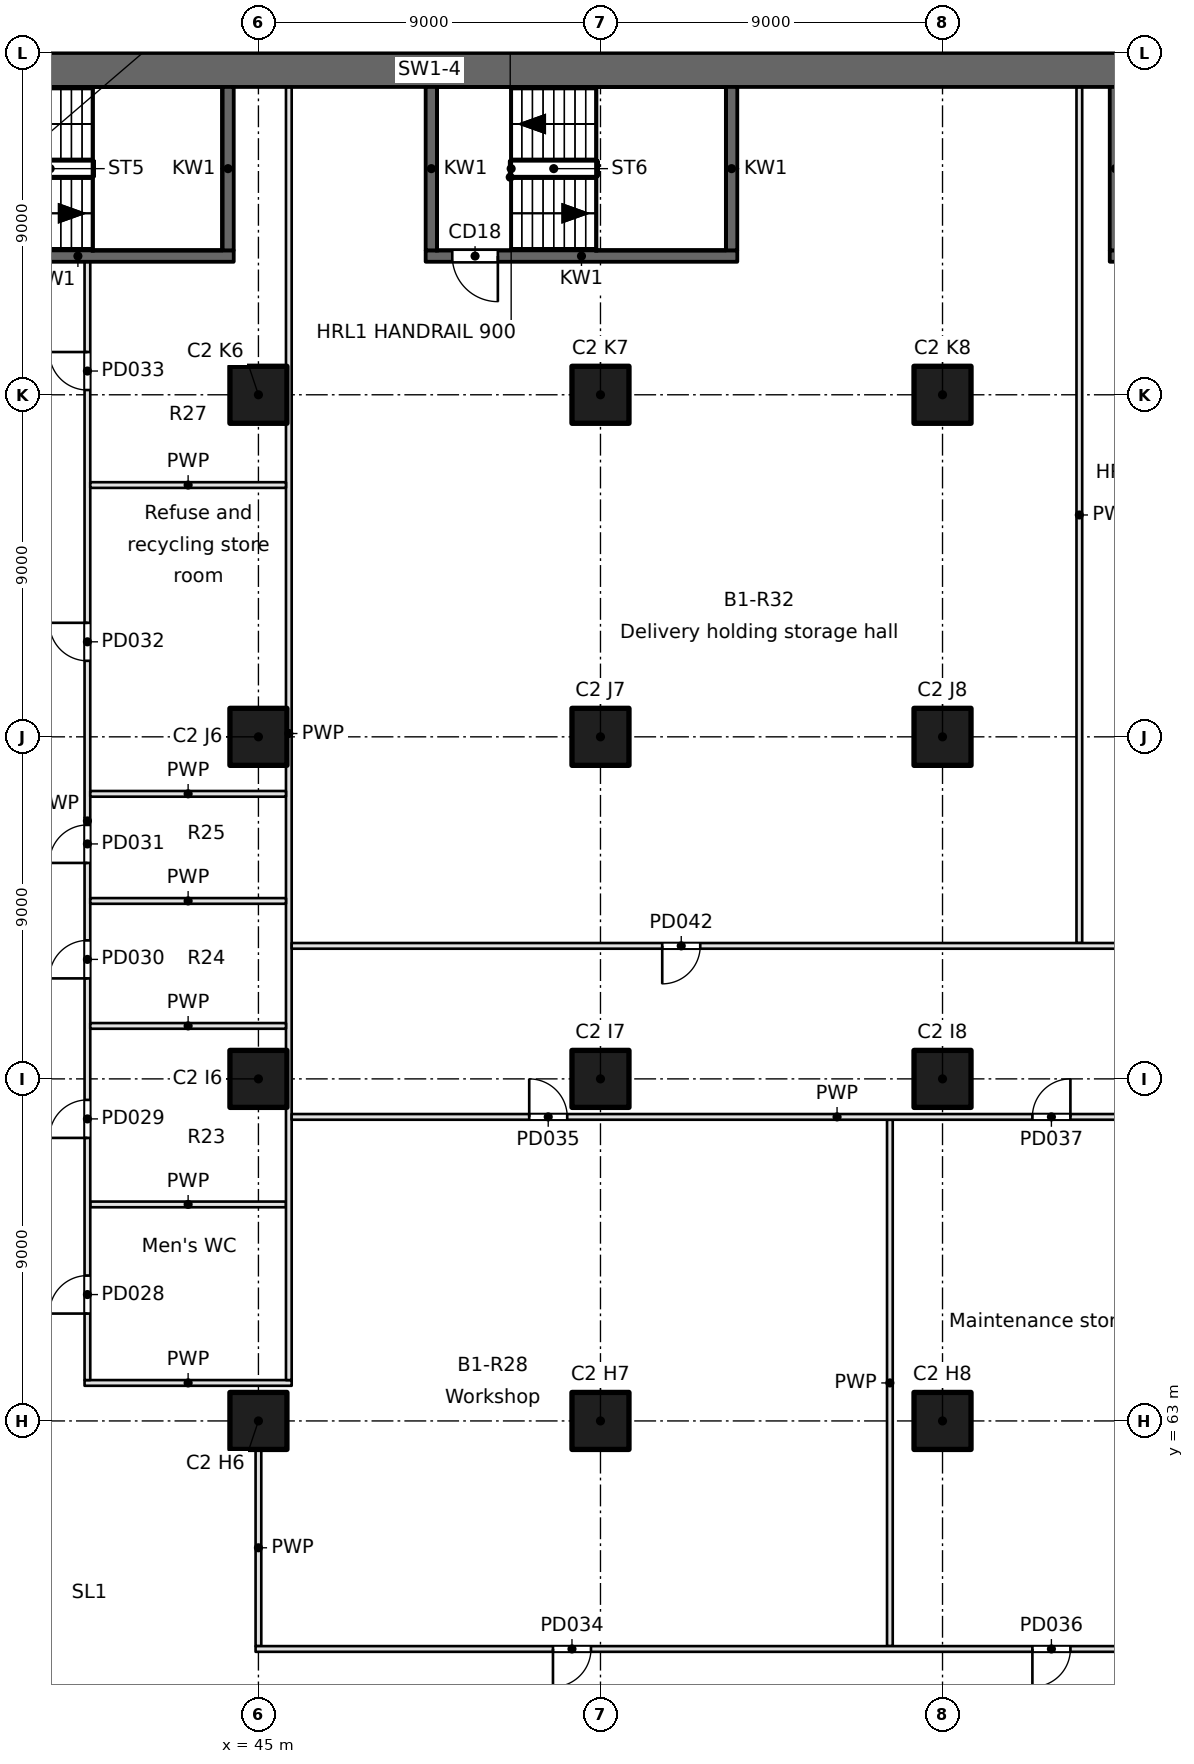
"""IFC4 building model, lengths in metres.
Left out: names, types, materials, properties, quantities, classifications, styles, units other than length and angle.
Written with IfcOpenShell. Run it as: python <this file> out.ifc"""

import sys

from ifc_helpers import new_model, si_unit, direction, frame, frame_2d, origin, origin_2d, place, context, subcontext, project, spatial, rectangle, extrude, element, fill, save


model = new_model("IFC4")
c1 = context("Model", 3, precision=1e-05, world=origin(), true_north=direction((0.0, 1.0)))
c2 = subcontext(c1, "Body", "Model", "MODEL_VIEW")
j1 = project(units=[si_unit("LENGTHUNIT", "METRE"), si_unit("PLANEANGLEUNIT", "RADIAN")], contexts=[c1])
p1 = place(None, origin())
s1 = spatial("IfcSite", under=j1, at=p1, CompositionType="ELEMENT")
p2 = place(p1, origin())
s2 = spatial("IfcBuilding", under=s1, at=p2, CompositionType="ELEMENT")
p3 = place(p2, frame((0.0, 0.0, -6.0)))
s3 = spatial("IfcBuildingStorey", under=s2, at=p3, CompositionType="ELEMENT", Elevation=-6.0)
for number, where, z_axis, x_axis in (
    (1, (45.0, 63.0, -0.6), (0.0, 0.0, 1.0), (1.0, 0.0, 0.0)),
    (2, (45.0, 72.0, -0.6), (0.0, 0.0, 1.0), (1.0, 0.0, 0.0)),
    (3, (45.0, 81.0, -0.6), (0.0, 0.0, 1.0), (1.0, 0.0, 0.0)),
    (4, (45.0, 90.0, -0.6), (0.0, 0.0, 1.0), (1.0, 0.0, 0.0)),
    (5, (54.0, 63.0, -0.6), (0.0, 0.0, 1.0), (1.0, 0.0, 0.0)),
    (6, (54.0, 72.0, -0.6), (0.0, 0.0, 1.0), (1.0, 0.0, 0.0)),
    (7, (54.0, 81.0, -0.6), (0.0, 0.0, 1.0), (1.0, 0.0, 0.0)),
    (8, (54.0, 90.0, -0.6), (0.0, 0.0, 1.0), (1.0, 0.0, 0.0)),
    (9, (63.0, 63.0, -0.6), (0.0, 0.0, 1.0), (1.0, 0.0, 0.0)),
    (10, (63.0, 72.0, -0.6), (0.0, 0.0, 1.0), (1.0, 0.0, 0.0)),
    (11, (63.0, 81.0, -0.6), (0.0, 0.0, 1.0), (1.0, 0.0, 0.0)),
    (12, (63.0, 90.0, -0.6), (0.0, 0.0, 1.0), (1.0, 0.0, 0.0)),
):
    element("IfcColumn", number, at=place(p3, frame(where, z_axis=z_axis, x_axis=x_axis)), inside=s3, PredefinedType="COLUMN", context=c2, shape_type="SweptSolid", body=[
        extrude(rectangle(XDim=1.5, YDim=1.5, at=origin_2d()), origin(), (0.0, 0.0, 1.0), 6.6),
    ])
p4 = place(p3, frame((94.5, 98.55, 0.0), z_axis=(0.0, 0.0, 1.0), x_axis=(-1.0, 0.0, 0.0)))
e13 = element("IfcWall", 13, at=p4, inside=s3, PredefinedType="SHEAR", context=c2, shape_type="SweptSolid", body=[
    extrude(rectangle(XDim=90.0, YDim=0.9, at=frame_2d((45.0, 0.0))), origin(), (0.0, 0.0, 1.0), 6.0),
])
p5 = place(p3, frame((36.15, 93.65, 0.0), z_axis=(0.0, 0.0, 1.0), x_axis=(1.0, 0.0, 0.0)))
e14 = element("IfcWall", 14, at=p5, inside=s3, PredefinedType="SOLIDWALL", context=c2, shape_type="SweptSolid", body=[
    extrude(rectangle(XDim=8.2, YDim=0.3, at=frame_2d((4.1, 0.0))), origin(), (0.0, 0.0, 1.0), 5.6),
])
p6 = place(p5, frame((0.7, 0.0, 0.0)))
e15 = element("IfcOpeningElement", 15, at=p6, cuts=e14, PredefinedType="OPENING", context=c2, shape_type="SweptSolid", body=[
    extrude(rectangle(XDim=1.2, YDim=2.1, at=frame_2d((0.6, 1.05))), frame((0.0, 0.15, 0.0), z_axis=(0.0, -1.0, 0.0), x_axis=(1.0, 0.0, 0.0)), (0.0, 0.0, 1.0), 0.3),
])
p7 = place(p3, frame((49.4, 93.65, 0.0), z_axis=(0.0, 0.0, 1.0), x_axis=(1.0, 0.0, 0.0)))
e16 = element("IfcWall", 16, at=p7, inside=s3, PredefinedType="SOLIDWALL", context=c2, shape_type="SweptSolid", body=[
    extrude(rectangle(XDim=8.2, YDim=0.3, at=frame_2d((4.1, 0.0))), origin(), (0.0, 0.0, 1.0), 5.6),
])
p8 = place(p7, frame((0.7, 0.0, 0.0)))
e17 = element("IfcOpeningElement", 17, at=p8, cuts=e16, PredefinedType="OPENING", context=c2, shape_type="SweptSolid", body=[
    extrude(rectangle(XDim=1.2, YDim=2.1, at=frame_2d((0.6, 1.05))), frame((0.0, 0.15, 0.0), z_axis=(0.0, -1.0, 0.0), x_axis=(1.0, 0.0, 0.0)), (0.0, 0.0, 1.0), 0.3),
])
p9 = place(p3, frame((67.4, 93.65, 0.0), z_axis=(0.0, 0.0, 1.0), x_axis=(1.0, 0.0, 0.0)))
e18 = element("IfcWall", 18, at=p9, inside=s3, PredefinedType="SOLIDWALL", context=c2, shape_type="SweptSolid", body=[
    extrude(rectangle(XDim=8.2, YDim=0.3, at=frame_2d((4.1, 0.0))), origin(), (0.0, 0.0, 1.0), 5.6),
])
p10 = place(p9, frame((0.7, 0.0, 0.0)))
e19 = element("IfcOpeningElement", 19, at=p10, cuts=e18, PredefinedType="OPENING", context=c2, shape_type="SweptSolid", body=[
    extrude(rectangle(XDim=1.2, YDim=2.1, at=frame_2d((0.6, 1.05))), frame((0.0, 0.15, 0.0), z_axis=(0.0, -1.0, 0.0), x_axis=(1.0, 0.0, 0.0)), (0.0, 0.0, 1.0), 0.3),
])
for number, where, z_axis, x_axis in (
    (20, (44.2, 93.8, 0.0), (0.0, 0.0, 1.0), (0.0, 1.0, 0.0)),
    (21, (49.55, 93.8, 0.0), (0.0, 0.0, 1.0), (0.0, 1.0, 0.0)),
    (22, (57.45, 93.8, 0.0), (0.0, 0.0, 1.0), (0.0, 1.0, 0.0)),
    (23, (67.55, 93.8, 0.0), (0.0, 0.0, 1.0), (0.0, 1.0, 0.0)),
):
    element("IfcWall", number, at=place(p3, frame(where, z_axis=z_axis, x_axis=x_axis)), inside=s3, PredefinedType="SOLIDWALL", context=c2, shape_type="SweptSolid", body=[
        extrude(rectangle(XDim=4.3, YDim=0.3, at=frame_2d((2.15, 0.0))), origin(), (0.0, 0.0, 1.0), 5.6),
    ])
p11 = place(p3, frame((45.0, 57.075, 0.0), z_axis=(0.0, 0.0, 1.0), x_axis=(0.0, 1.0, 0.0)))
e24 = element("IfcWall", 24, at=p11, inside=s3, PredefinedType="PARTITIONING", context=c2, shape_type="SweptSolid", body=[
    extrude(rectangle(XDim=5.175, YDim=0.15, at=frame_2d((2.587, 0.0))), origin(), (0.0, 0.0, 1.0), 5.6),
])
p12 = place(p3, frame((40.575, 68.697, 0.0), z_axis=(0.0, 0.0, 1.0), x_axis=(1.0, 0.0, 0.0)))
e25 = element("IfcWall", 25, at=p12, inside=s3, PredefinedType="PARTITIONING", context=c2, shape_type="SweptSolid", body=[
    extrude(rectangle(XDim=5.15, YDim=0.15, at=frame_2d((2.575, 0.0))), origin(), (0.0, 0.0, 1.0), 5.6),
])
p13 = place(p3, frame((45.875, 64.0, 0.0), z_axis=(0.0, 0.0, 1.0), x_axis=(-1.0, 0.0, 0.0)))
e26 = element("IfcWall", 26, at=p13, inside=s3, PredefinedType="PARTITIONING", context=c2, shape_type="SweptSolid", body=[
    extrude(rectangle(XDim=5.45, YDim=0.15, at=frame_2d((2.725, 0.0))), origin(), (0.0, 0.0, 1.0), 5.6),
])
p14 = place(p3, frame((45.8, 64.075, 0.0), z_axis=(0.0, 0.0, 1.0), x_axis=(0.0, 1.0, 0.0)))
e27 = element("IfcWall", 27, at=p14, inside=s3, PredefinedType="PARTITIONING", context=c2, shape_type="SweptSolid", body=[
    extrude(rectangle(XDim=34.025, YDim=0.15, at=frame_2d((17.013, 0.0))), origin(), (0.0, 0.0, 1.0), 5.6),
])
p15 = place(p3, frame((40.5, 64.075, 0.0), z_axis=(0.0, 0.0, 1.0), x_axis=(0.0, 1.0, 0.0)))
e28 = element("IfcWall", 28, at=p15, inside=s3, PredefinedType="PARTITIONING", context=c2, shape_type="SweptSolid", body=[
    extrude(rectangle(XDim=29.425, YDim=0.15, at=frame_2d((14.712, 0.0))), origin(), (0.0, 0.0, 1.0), 5.6),
])
p16 = place(p15, frame((1.75, 0.0, 0.0)))
e29 = element("IfcOpeningElement", 29, at=p16, cuts=e28, PredefinedType="OPENING", context=c2, shape_type="SweptSolid", body=[
    extrude(rectangle(XDim=1.0, YDim=2.1, at=frame_2d((0.5, 1.05))), frame((0.0, 0.075, 0.0), z_axis=(0.0, -1.0, 0.0), x_axis=(1.0, 0.0, 0.0)), (0.0, 0.0, 1.0), 0.15),
])
p17 = place(p15, frame((6.372, 0.0, 0.0)))
e30 = element("IfcOpeningElement", 30, at=p17, cuts=e28, PredefinedType="OPENING", context=c2, shape_type="SweptSolid", body=[
    extrude(rectangle(XDim=1.0, YDim=2.1, at=frame_2d((0.5, 1.05))), frame((0.0, 0.075, 0.0), z_axis=(0.0, -1.0, 0.0), x_axis=(1.0, 0.0, 0.0)), (0.0, 0.0, 1.0), 0.15),
])
p18 = place(p15, frame((10.569, 0.0, 0.0)))
e31 = element("IfcOpeningElement", 31, at=p18, cuts=e28, PredefinedType="OPENING", context=c2, shape_type="SweptSolid", body=[
    extrude(rectangle(XDim=1.0, YDim=2.1, at=frame_2d((0.5, 1.05))), frame((0.0, 0.075, 0.0), z_axis=(0.0, -1.0, 0.0), x_axis=(1.0, 0.0, 0.0)), (0.0, 0.0, 1.0), 0.15),
])
p19 = place(p15, frame((13.607, 0.0, 0.0)))
e32 = element("IfcOpeningElement", 32, at=p19, cuts=e28, PredefinedType="OPENING", context=c2, shape_type="SweptSolid", body=[
    extrude(rectangle(XDim=1.0, YDim=2.1, at=frame_2d((0.5, 1.05))), frame((0.0, 0.075, 0.0), z_axis=(0.0, -1.0, 0.0), x_axis=(1.0, 0.0, 0.0)), (0.0, 0.0, 1.0), 0.15),
])
p20 = place(p15, frame((18.925, 0.0, 0.0)))
e33 = element("IfcOpeningElement", 33, at=p20, cuts=e28, PredefinedType="OPENING", context=c2, shape_type="SweptSolid", body=[
    extrude(rectangle(XDim=1.0, YDim=2.1, at=frame_2d((0.5, 1.05))), frame((0.0, 0.075, 0.0), z_axis=(0.0, -1.0, 0.0), x_axis=(1.0, 0.0, 0.0)), (0.0, 0.0, 1.0), 0.15),
])
p21 = place(p15, frame((26.05, 0.0, 0.0)))
e34 = element("IfcOpeningElement", 34, at=p21, cuts=e28, PredefinedType="OPENING", context=c2, shape_type="SweptSolid", body=[
    extrude(rectangle(XDim=1.0, YDim=2.1, at=frame_2d((0.5, 1.05))), frame((0.0, 0.075, 0.0), z_axis=(0.0, -1.0, 0.0), x_axis=(1.0, 0.0, 0.0)), (0.0, 0.0, 1.0), 0.15),
])
for number, where, z_axis, x_axis in (
    (35, (40.575, 73.394, 0.0), (0.0, 0.0, 1.0), (1.0, 0.0, 0.0)),
    (36, (40.575, 76.682, 0.0), (0.0, 0.0, 1.0), (1.0, 0.0, 0.0)),
    (37, (40.575, 79.5, 0.0), (0.0, 0.0, 1.0), (1.0, 0.0, 0.0)),
    (38, (40.575, 87.625, 0.0), (0.0, 0.0, 1.0), (1.0, 0.0, 0.0)),
):
    element("IfcWall", number, at=place(p3, frame(where, z_axis=z_axis, x_axis=x_axis)), inside=s3, PredefinedType="PARTITIONING", context=c2, shape_type="SweptSolid", body=[
        extrude(rectangle(XDim=5.15, YDim=0.15, at=frame_2d((2.575, 0.0))), origin(), (0.0, 0.0, 1.0), 5.6),
    ])
p22 = place(p3, frame((61.615, 57.075, 0.0), z_axis=(0.0, 0.0, 1.0), x_axis=(0.0, 1.0, 0.0)))
e39 = element("IfcWall", 39, at=p22, inside=s3, PredefinedType="PARTITIONING", context=c2, shape_type="SweptSolid", body=[
    extrude(rectangle(XDim=13.85, YDim=0.15, at=frame_2d((6.925, 0.0))), origin(), (0.0, 0.0, 1.0), 5.6),
])
p23 = place(p3, frame((94.2, 57.0, 0.0), z_axis=(0.0, 0.0, 1.0), x_axis=(-1.0, 0.0, 0.0)))
e40 = element("IfcWall", 40, at=p23, inside=s3, PredefinedType="PARTITIONING", context=c2, shape_type="SweptSolid", body=[
    extrude(rectangle(XDim=49.275, YDim=0.15, at=frame_2d((24.637, 0.0))), origin(), (0.0, 0.0, 1.0), 5.6),
])
p24 = place(p23, frame((40.45, 0.0, 0.0)))
e41 = element("IfcOpeningElement", 41, at=p24, cuts=e40, PredefinedType="OPENING", context=c2, shape_type="SweptSolid", body=[
    extrude(rectangle(XDim=1.0, YDim=2.1, at=frame_2d((0.5, 1.05))), frame((0.0, 0.075, 0.0), z_axis=(0.0, -1.0, 0.0), x_axis=(1.0, 0.0, 0.0)), (0.0, 0.0, 1.0), 0.15),
])
p25 = place(p23, frame((27.835, 0.0, 0.0)))
e42 = element("IfcOpeningElement", 42, at=p25, cuts=e40, PredefinedType="OPENING", context=c2, shape_type="SweptSolid", body=[
    extrude(rectangle(XDim=1.0, YDim=2.1, at=frame_2d((0.5, 1.05))), frame((0.0, 0.075, 0.0), z_axis=(0.0, -1.0, 0.0), x_axis=(1.0, 0.0, 0.0)), (0.0, 0.0, 1.0), 0.15),
])
p26 = place(p23, frame((15.327, 0.0, 0.0)))
e43 = element("IfcOpeningElement", 43, at=p26, cuts=e40, PredefinedType="OPENING", context=c2, shape_type="SweptSolid", body=[
    extrude(rectangle(XDim=1.2, YDim=2.1, at=frame_2d((0.6, 1.05))), frame((0.0, 0.075, 0.0), z_axis=(0.0, -1.0, 0.0), x_axis=(1.0, 0.0, 0.0)), (0.0, 0.0, 1.0), 0.15),
])
p27 = place(p23, frame((3.212, 0.0, 0.0)))
e44 = element("IfcOpeningElement", 44, at=p27, cuts=e40, PredefinedType="OPENING", context=c2, shape_type="SweptSolid", body=[
    extrude(rectangle(XDim=1.2, YDim=2.1, at=frame_2d((0.6, 1.05))), frame((0.0, 0.075, 0.0), z_axis=(0.0, -1.0, 0.0), x_axis=(1.0, 0.0, 0.0)), (0.0, 0.0, 1.0), 0.15),
])
p28 = place(p3, frame((45.875, 71.0, 0.0), z_axis=(0.0, 0.0, 1.0), x_axis=(1.0, 0.0, 0.0)))
e45 = element("IfcWall", 45, at=p28, inside=s3, PredefinedType="PARTITIONING", context=c2, shape_type="SweptSolid", body=[
    extrude(rectangle(XDim=28.7, YDim=0.15, at=frame_2d((14.35, 0.0))), origin(), (0.0, 0.0, 1.0), 5.6),
])
p29 = place(p28, frame((6.25, 0.0, 0.0)))
e46 = element("IfcOpeningElement", 46, at=p29, cuts=e45, PredefinedType="OPENING", context=c2, shape_type="SweptSolid", body=[
    extrude(rectangle(XDim=1.0, YDim=2.1, at=frame_2d((0.5, 1.05))), frame((0.0, 0.075, 0.0), z_axis=(0.0, -1.0, 0.0), x_axis=(1.0, 0.0, 0.0)), (0.0, 0.0, 1.0), 0.15),
])
p30 = place(p28, frame((19.49, 0.0, 0.0)))
e47 = element("IfcOpeningElement", 47, at=p30, cuts=e45, PredefinedType="OPENING", context=c2, shape_type="SweptSolid", body=[
    extrude(rectangle(XDim=1.0, YDim=2.1, at=frame_2d((0.5, 1.05))), frame((0.0, 0.075, 0.0), z_axis=(0.0, -1.0, 0.0), x_axis=(1.0, 0.0, 0.0)), (0.0, 0.0, 1.0), 0.15),
])
p31 = place(p28, frame((27.048, 0.0, 0.0)))
e48 = element("IfcOpeningElement", 48, at=p31, cuts=e45, PredefinedType="OPENING", context=c2, shape_type="SweptSolid", body=[
    extrude(rectangle(XDim=1.2, YDim=2.1, at=frame_2d((0.6, 1.05))), frame((0.0, 0.075, 0.0), z_axis=(0.0, -1.0, 0.0), x_axis=(1.0, 0.0, 0.0)), (0.0, 0.0, 1.0), 0.15),
])
p32 = place(p3, frame((66.6, 75.575, 0.0), z_axis=(0.0, 0.0, 1.0), x_axis=(0.0, 1.0, 0.0)))
e49 = element("IfcWall", 49, at=p32, inside=s3, PredefinedType="PARTITIONING", context=c2, shape_type="SweptSolid", body=[
    extrude(rectangle(XDim=22.525, YDim=0.15, at=frame_2d((11.263, 0.0))), origin(), (0.0, 0.0, 1.0), 5.6),
])
p33 = place(p3, frame((98.7, 75.5, 0.0), z_axis=(0.0, 0.0, 1.0), x_axis=(-1.0, 0.0, 0.0)))
e50 = element("IfcWall", 50, at=p33, inside=s3, PredefinedType="PARTITIONING", context=c2, shape_type="SweptSolid", body=[
    extrude(rectangle(XDim=52.825, YDim=0.15, at=frame_2d((26.413, 0.0))), origin(), (0.0, 0.0, 1.0), 5.6),
])
p34 = place(p33, frame((42.075, 0.0, 0.0)))
e51 = element("IfcOpeningElement", 51, at=p34, cuts=e50, PredefinedType="OPENING", context=c2, shape_type="SweptSolid", body=[
    extrude(rectangle(XDim=1.0, YDim=2.1, at=frame_2d((0.5, 1.05))), frame((0.0, 0.075, 0.0), z_axis=(0.0, -1.0, 0.0), x_axis=(1.0, 0.0, 0.0)), (0.0, 0.0, 1.0), 0.15),
])
p35 = place(p33, frame((26.1, 0.0, 0.0)))
e52 = element("IfcOpeningElement", 52, at=p35, cuts=e50, PredefinedType="OPENING", context=c2, shape_type="SweptSolid", body=[
    extrude(rectangle(XDim=1.0, YDim=2.1, at=frame_2d((0.5, 1.05))), frame((0.0, 0.075, 0.0), z_axis=(0.0, -1.0, 0.0), x_axis=(1.0, 0.0, 0.0)), (0.0, 0.0, 1.0), 0.15),
])
p36 = place(p33, frame((15.35, 0.0, 0.0)))
e53 = element("IfcOpeningElement", 53, at=p36, cuts=e50, PredefinedType="OPENING", context=c2, shape_type="SweptSolid", body=[
    extrude(rectangle(XDim=1.2, YDim=2.1, at=frame_2d((0.6, 1.05))), frame((0.0, 0.075, 0.0), z_axis=(0.0, -1.0, 0.0), x_axis=(1.0, 0.0, 0.0)), (0.0, 0.0, 1.0), 0.15),
])
p37 = place(p33, frame((4.75, 0.0, 0.0)))
e54 = element("IfcOpeningElement", 54, at=p37, cuts=e50, PredefinedType="OPENING", context=c2, shape_type="SweptSolid", body=[
    extrude(rectangle(XDim=1.0, YDim=2.1, at=frame_2d((0.5, 1.05))), frame((0.0, 0.075, 0.0), z_axis=(0.0, -1.0, 0.0), x_axis=(1.0, 0.0, 0.0)), (0.0, 0.0, 1.0), 0.15),
])
p38 = place(p8, frame((1.2, 0.0, 0.0), z_axis=(0.0, 0.0, 1.0), x_axis=(-1.0, 0.0, 0.0)))
e55 = element("IfcDoor", 55, at=p38, inside=s3, OperationType="SINGLE_SWING_LEFT", PredefinedType="DOOR", context=c2, shape_type="SweptSolid", body=[
    extrude(rectangle(XDim=1.2, YDim=2.1, at=frame_2d((0.6, 1.05))), frame((0.0, 0.025, 0.0), z_axis=(0.0, -1.0, 0.0), x_axis=(1.0, 0.0, 0.0)), (0.0, 0.0, 1.0), 0.05),
])
fill(e17, e55)
p39 = place(p16, origin())
e56 = element("IfcDoor", 56, at=p39, inside=s3, OperationType="SINGLE_SWING_LEFT", PredefinedType="DOOR", context=c2, shape_type="SweptSolid", body=[
    extrude(rectangle(XDim=1.0, YDim=2.1, at=frame_2d((0.5, 1.05))), frame((0.0, 0.025, 0.0), z_axis=(0.0, -1.0, 0.0), x_axis=(1.0, 0.0, 0.0)), (0.0, 0.0, 1.0), 0.05),
])
fill(e29, e56)
p40 = place(p17, origin())
e57 = element("IfcDoor", 57, at=p40, inside=s3, OperationType="SINGLE_SWING_LEFT", PredefinedType="DOOR", context=c2, shape_type="SweptSolid", body=[
    extrude(rectangle(XDim=1.0, YDim=2.1, at=frame_2d((0.5, 1.05))), frame((0.0, 0.025, 0.0), z_axis=(0.0, -1.0, 0.0), x_axis=(1.0, 0.0, 0.0)), (0.0, 0.0, 1.0), 0.05),
])
fill(e30, e57)
p41 = place(p18, origin())
e58 = element("IfcDoor", 58, at=p41, inside=s3, OperationType="SINGLE_SWING_LEFT", PredefinedType="DOOR", context=c2, shape_type="SweptSolid", body=[
    extrude(rectangle(XDim=1.0, YDim=2.1, at=frame_2d((0.5, 1.05))), frame((0.0, 0.025, 0.0), z_axis=(0.0, -1.0, 0.0), x_axis=(1.0, 0.0, 0.0)), (0.0, 0.0, 1.0), 0.05),
])
fill(e31, e58)
p42 = place(p19, origin())
e59 = element("IfcDoor", 59, at=p42, inside=s3, OperationType="SINGLE_SWING_LEFT", PredefinedType="DOOR", context=c2, shape_type="SweptSolid", body=[
    extrude(rectangle(XDim=1.0, YDim=2.1, at=frame_2d((0.5, 1.05))), frame((0.0, 0.025, 0.0), z_axis=(0.0, -1.0, 0.0), x_axis=(1.0, 0.0, 0.0)), (0.0, 0.0, 1.0), 0.05),
])
fill(e32, e59)
p43 = place(p20, origin())
e60 = element("IfcDoor", 60, at=p43, inside=s3, OperationType="SINGLE_SWING_RIGHT", PredefinedType="DOOR", context=c2, shape_type="SweptSolid", body=[
    extrude(rectangle(XDim=1.0, YDim=2.1, at=frame_2d((0.5, 1.05))), frame((0.0, 0.025, 0.0), z_axis=(0.0, -1.0, 0.0), x_axis=(1.0, 0.0, 0.0)), (0.0, 0.0, 1.0), 0.05),
])
fill(e33, e60)
p44 = place(p21, origin())
e61 = element("IfcDoor", 61, at=p44, inside=s3, OperationType="SINGLE_SWING_RIGHT", PredefinedType="DOOR", context=c2, shape_type="SweptSolid", body=[
    extrude(rectangle(XDim=1.0, YDim=2.1, at=frame_2d((0.5, 1.05))), frame((0.0, 0.025, 0.0), z_axis=(0.0, -1.0, 0.0), x_axis=(1.0, 0.0, 0.0)), (0.0, 0.0, 1.0), 0.05),
])
fill(e34, e61)
p45 = place(p24, origin())
e62 = element("IfcDoor", 62, at=p45, inside=s3, OperationType="SINGLE_SWING_RIGHT", PredefinedType="DOOR", context=c2, shape_type="SweptSolid", body=[
    extrude(rectangle(XDim=1.0, YDim=2.1, at=frame_2d((0.5, 1.05))), frame((0.0, 0.025, 0.0), z_axis=(0.0, -1.0, 0.0), x_axis=(1.0, 0.0, 0.0)), (0.0, 0.0, 1.0), 0.05),
])
fill(e41, e62)
p46 = place(p29, origin())
e63 = element("IfcDoor", 63, at=p46, inside=s3, OperationType="SINGLE_SWING_LEFT", PredefinedType="DOOR", context=c2, shape_type="SweptSolid", body=[
    extrude(rectangle(XDim=1.0, YDim=2.1, at=frame_2d((0.5, 1.05))), frame((0.0, 0.025, 0.0), z_axis=(0.0, -1.0, 0.0), x_axis=(1.0, 0.0, 0.0)), (0.0, 0.0, 1.0), 0.05),
])
fill(e46, e63)
p47 = place(p25, origin())
e64 = element("IfcDoor", 64, at=p47, inside=s3, OperationType="SINGLE_SWING_RIGHT", PredefinedType="DOOR", context=c2, shape_type="SweptSolid", body=[
    extrude(rectangle(XDim=1.0, YDim=2.1, at=frame_2d((0.5, 1.05))), frame((0.0, 0.025, 0.0), z_axis=(0.0, -1.0, 0.0), x_axis=(1.0, 0.0, 0.0)), (0.0, 0.0, 1.0), 0.05),
])
fill(e42, e64)
p48 = place(p30, origin())
e65 = element("IfcDoor", 65, at=p48, inside=s3, OperationType="SINGLE_SWING_RIGHT", PredefinedType="DOOR", context=c2, shape_type="SweptSolid", body=[
    extrude(rectangle(XDim=1.0, YDim=2.1, at=frame_2d((0.5, 1.05))), frame((0.0, 0.025, 0.0), z_axis=(0.0, -1.0, 0.0), x_axis=(1.0, 0.0, 0.0)), (0.0, 0.0, 1.0), 0.05),
])
fill(e47, e65)
p49 = place(p34, origin())
e66 = element("IfcDoor", 66, at=p49, inside=s3, OperationType="SINGLE_SWING_RIGHT", PredefinedType="DOOR", context=c2, shape_type="SweptSolid", body=[
    extrude(rectangle(XDim=1.0, YDim=2.1, at=frame_2d((0.5, 1.05))), frame((0.0, 0.025, 0.0), z_axis=(0.0, -1.0, 0.0), x_axis=(1.0, 0.0, 0.0)), (0.0, 0.0, 1.0), 0.05),
])
fill(e51, e66)
save(model, sys.argv[1])
